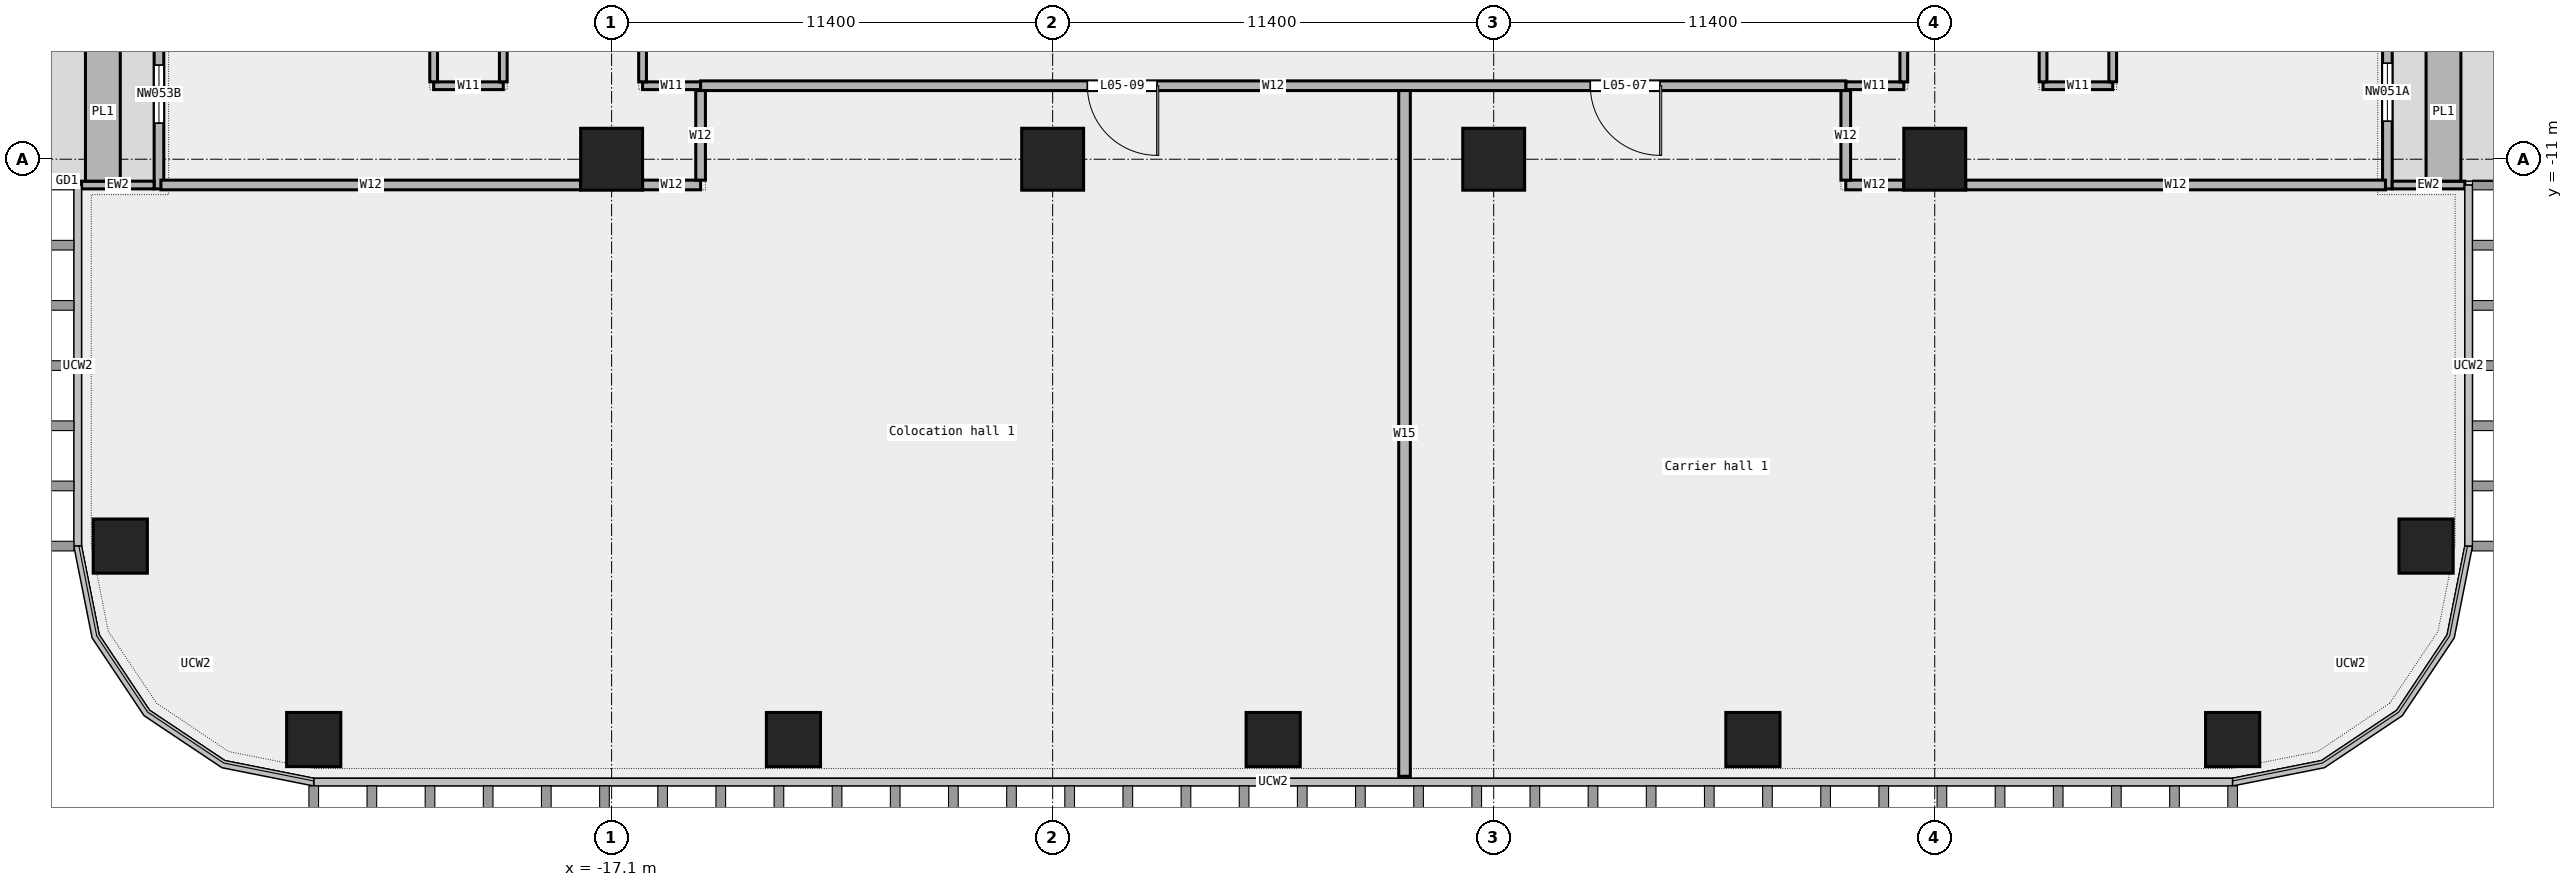
"""IFC4 building model, lengths in metres.
Left out: names, types, materials, properties, quantities, classifications, styles, units other than length and angle.
Written with IfcOpenShell. Run it as: python <this file> out.ifc"""

import sys

from ifc_helpers import new_model, si_unit, direction, frame, frame_2d, origin, origin_2d, place, context, subcontext, project, spatial, rectangle, extrude, element, fill, save


model = new_model("IFC4")
c1 = context("Model", 3, precision=1e-05, world=origin(), true_north=direction((0.0, 1.0)))
c2 = subcontext(c1, "Body", "Model", "MODEL_VIEW")
j1 = project(units=[si_unit("LENGTHUNIT", "METRE"), si_unit("PLANEANGLEUNIT", "RADIAN")], contexts=[c1])
p1 = place(None, origin())
s1 = spatial("IfcSite", under=j1, at=p1, CompositionType="ELEMENT")
p2 = place(p1, origin())
s2 = spatial("IfcBuilding", under=s1, at=p2, CompositionType="ELEMENT")
p3 = place(p2, frame((0.0, 0.0, 31.0)))
s3 = spatial("IfcBuildingStorey", under=s2, at=p3, CompositionType="ELEMENT", Elevation=31.0)
for number, where, z_axis, x_axis in (
    (1, (-24.8, -26.0, 0.0), (0.0, 0.0, 1.0), (1.0, 0.0, 0.0)),
    (2, (-12.4, -26.0, 0.0), (0.0, 0.0, 1.0), (1.0, 0.0, 0.0)),
    (3, (0.0, -26.0, 0.0), (0.0, 0.0, 1.0), (1.0, 0.0, 0.0)),
    (4, (12.4, -26.0, 0.0), (0.0, 0.0, 1.0), (1.0, 0.0, 0.0)),
    (5, (24.8, -26.0, 0.0), (0.0, 0.0, 1.0), (1.0, 0.0, 0.0)),
    (6, (29.8, -21.0, 0.0), (0.0, 0.0, 1.0), (1.0, 0.0, 0.0)),
    (7, (-29.8, -21.0, 0.0), (0.0, 0.0, 1.0), (1.0, 0.0, 0.0)),
):
    element("IfcColumn", number, at=place(p3, frame(where, z_axis=z_axis, x_axis=x_axis)), inside=s3, PredefinedType="COLUMN", context=c2, shape_type="SweptSolid", body=[
        extrude(rectangle(XDim=1.4, YDim=1.4, at=origin_2d()), origin(), (0.0, 0.0, 1.0), 4.35),
    ])
for number, where, z_axis, x_axis in (
    (8, (-17.1, -11.0, 0.0), (0.0, 0.0, 1.0), (1.0, 0.0, 0.0)),
    (9, (-5.7, -11.0, 0.0), (0.0, 0.0, 1.0), (1.0, 0.0, 0.0)),
    (10, (5.7, -11.0, 0.0), (0.0, 0.0, 1.0), (1.0, 0.0, 0.0)),
    (11, (17.1, -11.0, 0.0), (0.0, 0.0, 1.0), (1.0, 0.0, 0.0)),
):
    element("IfcColumn", number, at=place(p3, frame(where, z_axis=z_axis, x_axis=x_axis)), inside=s3, PredefinedType="COLUMN", context=c2, shape_type="SweptSolid", body=[
        extrude(rectangle(XDim=1.6, YDim=1.6, at=origin_2d()), origin(), (0.0, 0.0, 1.0), 4.35),
    ])
p4 = place(p3, frame((28.8, -11.767, 0.0), z_axis=(0.0, 0.0, 1.0), x_axis=(0.0, 1.0, 0.0)))
e12 = element("IfcWall", 12, at=p4, inside=s3, PredefinedType="STANDARD", context=c2, shape_type="SweptSolid", body=[
    extrude(rectangle(XDim=14.2, YDim=0.25, at=frame_2d((7.1, 0.0))), origin(), (0.0, 0.0, 1.0), 4.35),
])
p5 = place(p4, frame((1.75, 0.0, 0.45)))
e13 = element("IfcOpeningElement", 13, at=p5, cuts=e12, PredefinedType="OPENING", context=c2, shape_type="SweptSolid", body=[
    extrude(rectangle(XDim=1.5, YDim=3.0, at=frame_2d((0.75, 1.5))), frame((0.0, 0.137, 0.0), z_axis=(0.0, -1.0, 0.0), x_axis=(1.0, 0.0, 0.0)), (0.0, 0.0, 1.0), 0.274),
])
p6 = place(p4, frame((6.25, 0.0, 0.0)))
e14 = element("IfcOpeningElement", 14, at=p6, cuts=e12, PredefinedType="OPENING", context=c2, shape_type="SweptSolid", body=[
    extrude(rectangle(XDim=1.8, YDim=2.4, at=frame_2d((0.9, 1.2))), frame((0.0, 0.137, 0.0), z_axis=(0.0, -1.0, 0.0), x_axis=(1.0, 0.0, 0.0)), (0.0, 0.0, 1.0), 0.274),
])
p7 = place(p4, frame((11.0, 0.0, 0.45)))
e15 = element("IfcOpeningElement", 15, at=p7, cuts=e12, PredefinedType="OPENING", context=c2, shape_type="SweptSolid", body=[
    extrude(rectangle(XDim=1.5, YDim=3.0, at=frame_2d((0.75, 1.5))), frame((0.0, 0.137, 0.0), z_axis=(0.0, -1.0, 0.0), x_axis=(1.0, 0.0, 0.0)), (0.0, 0.0, 1.0), 0.274),
])
p8 = place(p3, frame((30.8, -11.667, 0.0), z_axis=(0.0, 0.0, 1.0), x_axis=(-1.0, 0.0, 0.0)))
e16 = element("IfcWall", 16, at=p8, inside=s3, PredefinedType="STANDARD", context=c2, shape_type="SweptSolid", body=[
    extrude(rectangle(XDim=1.875, YDim=0.2, at=frame_2d((0.938, 0.0))), origin(), (0.0, 0.0, 1.0), 4.35),
])
p9 = place(p3, frame((30.25, -11.567, 0.0), z_axis=(0.0, 0.0, 1.0), x_axis=(0.0, 1.0, 0.0)))
e17 = element("IfcWall", 17, at=p9, inside=s3, PredefinedType="STANDARD", context=c2, shape_type="SweptSolid", body=[
    extrude(rectangle(XDim=3.6, YDim=0.9, at=frame_2d((1.8, 0.0))), origin(), (0.0, 0.0, 1.0), 0.7),
])
p10 = place(p3, frame((-28.8, 2.433, 0.0), z_axis=(0.0, 0.0, 1.0), x_axis=(0.0, -1.0, 0.0)))
e18 = element("IfcWall", 18, at=p10, inside=s3, PredefinedType="STANDARD", context=c2, shape_type="SweptSolid", body=[
    extrude(rectangle(XDim=14.2, YDim=0.25, at=frame_2d((7.1, 0.0))), origin(), (0.0, 0.0, 1.0), 4.35),
])
p11 = place(p10, frame((1.75, 0.0, 0.45)))
e19 = element("IfcOpeningElement", 19, at=p11, cuts=e18, PredefinedType="OPENING", context=c2, shape_type="SweptSolid", body=[
    extrude(rectangle(XDim=1.5, YDim=3.0, at=frame_2d((0.75, 1.5))), frame((0.0, 0.137, 0.0), z_axis=(0.0, -1.0, 0.0), x_axis=(1.0, 0.0, 0.0)), (0.0, 0.0, 1.0), 0.274),
])
p12 = place(p10, frame((6.25, 0.0, 0.0)))
e20 = element("IfcOpeningElement", 20, at=p12, cuts=e18, PredefinedType="OPENING", context=c2, shape_type="SweptSolid", body=[
    extrude(rectangle(XDim=1.8, YDim=2.4, at=frame_2d((0.9, 1.2))), frame((0.0, 0.137, 0.0), z_axis=(0.0, -1.0, 0.0), x_axis=(1.0, 0.0, 0.0)), (0.0, 0.0, 1.0), 0.274),
])
p13 = place(p10, frame((11.0, 0.0, 0.45)))
e21 = element("IfcOpeningElement", 21, at=p13, cuts=e18, PredefinedType="OPENING", context=c2, shape_type="SweptSolid", body=[
    extrude(rectangle(XDim=1.5, YDim=3.0, at=frame_2d((0.75, 1.5))), frame((0.0, 0.137, 0.0), z_axis=(0.0, -1.0, 0.0), x_axis=(1.0, 0.0, 0.0)), (0.0, 0.0, 1.0), 0.274),
])
p14 = place(p3, frame((-30.8, -11.667, 0.0), z_axis=(0.0, 0.0, 1.0), x_axis=(1.0, 0.0, 0.0)))
e22 = element("IfcWall", 22, at=p14, inside=s3, PredefinedType="STANDARD", context=c2, shape_type="SweptSolid", body=[
    extrude(rectangle(XDim=1.875, YDim=0.2, at=frame_2d((0.938, 0.0))), origin(), (0.0, 0.0, 1.0), 4.35),
])
p15 = place(p3, frame((-30.25, -7.967, 0.0), z_axis=(0.0, 0.0, 1.0), x_axis=(0.0, -1.0, 0.0)))
e23 = element("IfcWall", 23, at=p15, inside=s3, PredefinedType="STANDARD", context=c2, shape_type="SweptSolid", body=[
    extrude(rectangle(XDim=3.6, YDim=0.9, at=frame_2d((1.8, 0.0))), origin(), (0.0, 0.0, 1.0), 0.7),
])
p16 = place(p3, frame((-28.75, -11.665, 0.0), z_axis=(0.0, 0.0, 1.0), x_axis=(1.0, 0.0, 0.0)))
e24 = element("IfcWall", 24, at=p16, inside=s3, PredefinedType="PARTITIONING", context=c2, shape_type="SweptSolid", body=[
    extrude(rectangle(XDim=10.85, YDim=0.25, at=frame_2d((5.425, 0.0))), origin(), (0.0, 0.0, 1.0), 4.35),
])
for number, where, z_axis, x_axis in (
    (25, (-16.3, -11.665, 0.0), (0.0, 0.0, 1.0), (1.0, 0.0, 0.0)),
    (26, (14.8, -11.665, 0.0), (0.0, 0.0, 1.0), (1.0, 0.0, 0.0)),
):
    element("IfcWall", number, at=place(p3, frame(where, z_axis=z_axis, x_axis=x_axis)), inside=s3, PredefinedType="PARTITIONING", context=c2, shape_type="SweptSolid", body=[
        extrude(rectangle(XDim=1.5, YDim=0.25, at=frame_2d((0.75, 0.0))), origin(), (0.0, 0.0, 1.0), 4.35),
    ])
p17 = place(p3, frame((17.9, -11.665, 0.0), z_axis=(0.0, 0.0, 1.0), x_axis=(1.0, 0.0, 0.0)))
e27 = element("IfcWall", 27, at=p17, inside=s3, PredefinedType="PARTITIONING", context=c2, shape_type="SweptSolid", body=[
    extrude(rectangle(XDim=10.85, YDim=0.25, at=frame_2d((5.425, 0.0))), origin(), (0.0, 0.0, 1.0), 4.35),
])
p18 = place(p3, frame((-21.7, -9.1, 0.0), z_axis=(0.0, 0.0, 1.0), x_axis=(1.0, 0.0, 0.0)))
e28 = element("IfcWall", 28, at=p18, inside=s3, PredefinedType="PARTITIONING", context=c2, shape_type="SweptSolid", body=[
    extrude(rectangle(XDim=1.8, YDim=0.2, at=frame_2d((0.9, 0.0))), origin(), (0.0, 0.0, 1.0), 4.35),
])
for number, where, z_axis, x_axis in (
    (29, (-16.3, -9.1, 0.0), (0.0, 0.0, 1.0), (1.0, 0.0, 0.0)),
    (30, (14.8, -9.1, 0.0), (0.0, 0.0, 1.0), (1.0, 0.0, 0.0)),
):
    element("IfcWall", number, at=place(p3, frame(where, z_axis=z_axis, x_axis=x_axis)), inside=s3, PredefinedType="PARTITIONING", context=c2, shape_type="SweptSolid", body=[
        extrude(rectangle(XDim=1.5, YDim=0.2, at=frame_2d((0.75, 0.0))), origin(), (0.0, 0.0, 1.0), 4.35),
    ])
p19 = place(p3, frame((19.9, -9.1, 0.0), z_axis=(0.0, 0.0, 1.0), x_axis=(1.0, 0.0, 0.0)))
e31 = element("IfcWall", 31, at=p19, inside=s3, PredefinedType="PARTITIONING", context=c2, shape_type="SweptSolid", body=[
    extrude(rectangle(XDim=1.8, YDim=0.2, at=frame_2d((0.9, 0.0))), origin(), (0.0, 0.0, 1.0), 4.35),
])
p20 = place(p3, frame((-14.8, -9.1, 0.0), z_axis=(0.0, 0.0, 1.0), x_axis=(1.0, 0.0, 0.0)))
e32 = element("IfcWall", 32, at=p20, inside=s3, PredefinedType="PARTITIONING", context=c2, shape_type="SweptSolid", body=[
    extrude(rectangle(XDim=29.6, YDim=0.25, at=frame_2d((14.8, 0.0))), origin(), (0.0, 0.0, 1.0), 4.35),
])
p21 = place(p20, frame((22.998, 0.0, 0.0)))
e33 = element("IfcOpeningElement", 33, at=p21, cuts=e32, PredefinedType="OPENING", context=c2, shape_type="SweptSolid", body=[
    extrude(rectangle(XDim=1.8, YDim=2.1, at=frame_2d((0.9, 1.05))), frame((0.0, 0.137, 0.0), z_axis=(0.0, -1.0, 0.0), x_axis=(1.0, 0.0, 0.0)), (0.0, 0.0, 1.0), 0.274),
])
p22 = place(p20, frame((9.998, 0.0, 0.0)))
e34 = element("IfcOpeningElement", 34, at=p22, cuts=e32, PredefinedType="OPENING", context=c2, shape_type="SweptSolid", body=[
    extrude(rectangle(XDim=1.8, YDim=2.1, at=frame_2d((0.9, 1.05))), frame((0.0, 0.137, 0.0), z_axis=(0.0, -1.0, 0.0), x_axis=(1.0, 0.0, 0.0)), (0.0, 0.0, 1.0), 0.274),
])
p23 = place(p3, frame((-21.7, -9.0, 0.0), z_axis=(0.0, 0.0, 1.0), x_axis=(0.0, 1.0, 0.0)))
e35 = element("IfcWall", 35, at=p23, inside=s3, PredefinedType="PARTITIONING", context=c2, shape_type="SweptSolid", body=[
    extrude(rectangle(XDim=11.21, YDim=0.2, at=frame_2d((5.605, 0.0))), origin(), (0.0, 0.0, 1.0), 4.35),
])
p24 = place(p23, frame((4.705, 0.0, 0.0)))
e36 = element("IfcOpeningElement", 36, at=p24, cuts=e35, PredefinedType="OPENING", context=c2, shape_type="SweptSolid", body=[
    extrude(rectangle(XDim=1.8, YDim=2.1, at=frame_2d((0.9, 1.05))), frame((0.0, 0.112, 0.0), z_axis=(0.0, -1.0, 0.0), x_axis=(1.0, 0.0, 0.0)), (0.0, 0.0, 1.0), 0.224),
])
p25 = place(p3, frame((-19.9, -9.0, 0.0), z_axis=(0.0, 0.0, 1.0), x_axis=(0.0, 1.0, 0.0)))
e37 = element("IfcWall", 37, at=p25, inside=s3, PredefinedType="PARTITIONING", context=c2, shape_type="SweptSolid", body=[
    extrude(rectangle(XDim=11.15, YDim=0.2, at=frame_2d((5.575, 0.0))), origin(), (0.0, 0.0, 1.0), 4.35),
])
p26 = place(p3, frame((-16.3, -9.0, 0.0), z_axis=(0.0, 0.0, 1.0), x_axis=(0.0, 1.0, 0.0)))
e38 = element("IfcWall", 38, at=p26, inside=s3, PredefinedType="PARTITIONING", context=c2, shape_type="SweptSolid", body=[
    extrude(rectangle(XDim=8.2, YDim=0.2, at=frame_2d((4.1, 0.0))), origin(), (0.0, 0.0, 1.0), 4.35),
])
p27 = place(p3, frame((-14.8, -11.54, 0.0), z_axis=(0.0, 0.0, 1.0), x_axis=(0.0, 1.0, 0.0)))
e39 = element("IfcWall", 39, at=p27, inside=s3, PredefinedType="PARTITIONING", context=c2, shape_type="SweptSolid", body=[
    extrude(rectangle(XDim=2.315, YDim=0.25, at=frame_2d((1.157, 0.0))), origin(), (0.0, 0.0, 1.0), 4.35),
])
p28 = place(p3, frame((3.395, -26.95, 0.0), z_axis=(0.0, 0.0, 1.0), x_axis=(0.0, 1.0, 0.0)))
e40 = element("IfcWall", 40, at=p28, inside=s3, PredefinedType="PARTITIONING", context=c2, shape_type="SweptSolid", body=[
    extrude(rectangle(XDim=17.725, YDim=0.3, at=frame_2d((8.862, 0.0))), origin(), (0.0, 0.0, 1.0), 4.35),
])
p29 = place(p3, frame((14.8, -11.54, 0.0), z_axis=(0.0, 0.0, 1.0), x_axis=(0.0, 1.0, 0.0)))
e41 = element("IfcWall", 41, at=p29, inside=s3, PredefinedType="PARTITIONING", context=c2, shape_type="SweptSolid", body=[
    extrude(rectangle(XDim=2.315, YDim=0.25, at=frame_2d((1.157, 0.0))), origin(), (0.0, 0.0, 1.0), 4.35),
])
p30 = place(p3, frame((16.3, -9.0, 0.0), z_axis=(0.0, 0.0, 1.0), x_axis=(0.0, 1.0, 0.0)))
e42 = element("IfcWall", 42, at=p30, inside=s3, PredefinedType="PARTITIONING", context=c2, shape_type="SweptSolid", body=[
    extrude(rectangle(XDim=8.2, YDim=0.2, at=frame_2d((4.1, 0.0))), origin(), (0.0, 0.0, 1.0), 4.35),
])
p31 = place(p3, frame((19.9, -9.0, 0.0), z_axis=(0.0, 0.0, 1.0), x_axis=(0.0, 1.0, 0.0)))
e43 = element("IfcWall", 43, at=p31, inside=s3, PredefinedType="PARTITIONING", context=c2, shape_type="SweptSolid", body=[
    extrude(rectangle(XDim=9.925, YDim=0.2, at=frame_2d((4.962, 0.0))), origin(), (0.0, 0.0, 1.0), 4.35),
])
p32 = place(p3, frame((21.7, -9.0, 0.0), z_axis=(0.0, 0.0, 1.0), x_axis=(0.0, 1.0, 0.0)))
e44 = element("IfcWall", 44, at=p32, inside=s3, PredefinedType="PARTITIONING", context=c2, shape_type="SweptSolid", body=[
    extrude(rectangle(XDim=24.275, YDim=0.2, at=frame_2d((12.137, 0.0))), origin(), (0.0, 0.0, 1.0), 4.35),
])
p33 = place(p32, frame((4.768, 0.0, 0.0)))
e45 = element("IfcOpeningElement", 45, at=p33, cuts=e44, PredefinedType="OPENING", context=c2, shape_type="SweptSolid", body=[
    extrude(rectangle(XDim=1.8, YDim=2.1, at=frame_2d((0.9, 1.05))), frame((0.0, 0.112, 0.0), z_axis=(0.0, -1.0, 0.0), x_axis=(1.0, 0.0, 0.0)), (0.0, 0.0, 1.0), 0.224),
])
p34 = place(p32, frame((17.055, 0.0, 0.0)))
e46 = element("IfcOpeningElement", 46, at=p34, cuts=e44, PredefinedType="OPENING", context=c2, shape_type="SweptSolid", body=[
    extrude(rectangle(XDim=1.5, YDim=2.1, at=frame_2d((0.75, 1.05))), frame((0.0, 0.112, 0.0), z_axis=(0.0, -1.0, 0.0), x_axis=(1.0, 0.0, 0.0)), (0.0, 0.0, 1.0), 0.224),
])
p35 = place(p5, origin())
e47 = element("IfcWindow", 47, at=p35, inside=s3, PartitioningType="SINGLE_PANEL", PredefinedType="WINDOW", context=c2, shape_type="SweptSolid", body=[
    extrude(rectangle(XDim=1.5, YDim=3.0, at=frame_2d((0.75, 1.5))), frame((0.0, 0.03, 0.0), z_axis=(0.0, -1.0, 0.0), x_axis=(1.0, 0.0, 0.0)), (0.0, 0.0, 1.0), 0.06),
])
fill(e13, e47)
p36 = place(p13, origin())
e48 = element("IfcWindow", 48, at=p36, inside=s3, PartitioningType="SINGLE_PANEL", PredefinedType="WINDOW", context=c2, shape_type="SweptSolid", body=[
    extrude(rectangle(XDim=1.5, YDim=3.0, at=frame_2d((0.75, 1.5))), frame((0.0, 0.03, 0.0), z_axis=(0.0, -1.0, 0.0), x_axis=(1.0, 0.0, 0.0)), (0.0, 0.0, 1.0), 0.06),
])
fill(e21, e48)
p37 = place(p21, origin())
e49 = element("IfcDoor", 49, at=p37, inside=s3, OperationType="DOUBLE_DOOR_SINGLE_SWING", PredefinedType="DOOR", context=c2, shape_type="SweptSolid", body=[
    extrude(rectangle(XDim=1.8, YDim=2.1, at=frame_2d((0.9, 1.05))), frame((0.0, 0.025, 0.0), z_axis=(0.0, -1.0, 0.0), x_axis=(1.0, 0.0, 0.0)), (0.0, 0.0, 1.0), 0.05),
])
fill(e33, e49)
p38 = place(p22, origin())
e50 = element("IfcDoor", 50, at=p38, inside=s3, OperationType="DOUBLE_DOOR_SINGLE_SWING", PredefinedType="DOOR", context=c2, shape_type="SweptSolid", body=[
    extrude(rectangle(XDim=1.8, YDim=2.1, at=frame_2d((0.9, 1.05))), frame((0.0, 0.025, 0.0), z_axis=(0.0, -1.0, 0.0), x_axis=(1.0, 0.0, 0.0)), (0.0, 0.0, 1.0), 0.05),
])
fill(e34, e50)
save(model, sys.argv[1])
